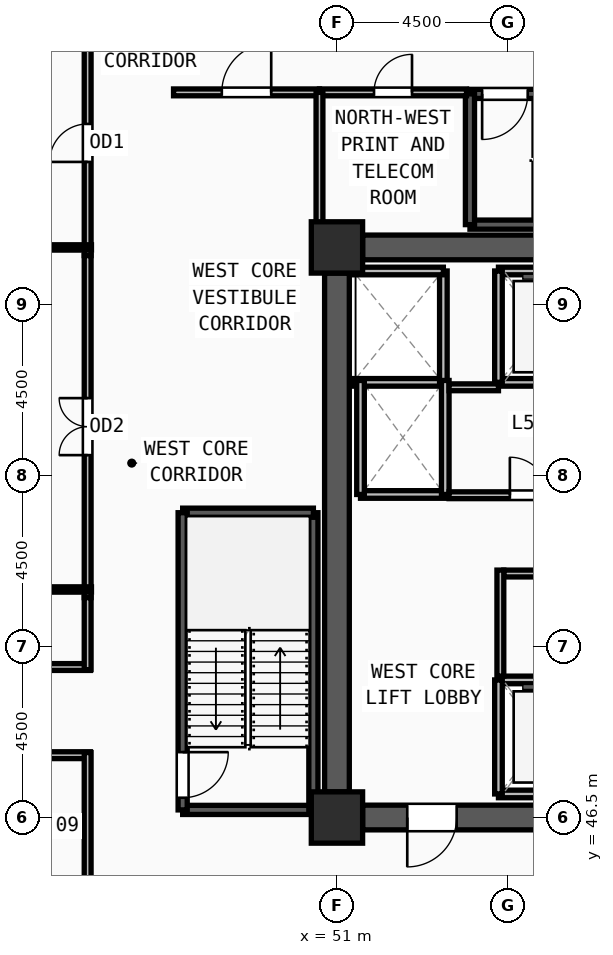
"""IFC4 building model, lengths in metres.
Left out: names, types, materials, properties, quantities, classifications, styles, units other than length and angle.
Written with IfcOpenShell. Run it as: python <this file> out.ifc"""

import sys

from ifc_helpers import new_model, si_unit, direction, frame, frame_2d, origin, origin_2d, place, context, subcontext, project, spatial, rectangle, extrude, source, transform, mapped, element, fill, save


model = new_model("IFC4")
c1 = context("Model", 3, precision=1e-05, world=origin(), true_north=direction((0.0, 1.0)))
c2 = subcontext(c1, "Body", "Model", "MODEL_VIEW")
j1 = project(units=[si_unit("LENGTHUNIT", "METRE"), si_unit("PLANEANGLEUNIT", "RADIAN")], contexts=[c1])
p1 = place(None, origin())
s1 = spatial("IfcSite", under=j1, at=p1, CompositionType="ELEMENT")
p2 = place(p1, origin())
s2 = spatial("IfcBuilding", under=s1, at=p2, CompositionType="ELEMENT")
p3 = place(p2, frame((0.0, 0.0, 201.75)))
s3 = spatial("IfcBuildingStorey", under=s2, at=p3, CompositionType="ELEMENT", Elevation=201.75)
m1 = source(origin(), c2, "Body", "SweptSolid", [
    extrude(rectangle(XDim=1.35, YDim=1.35, at=origin_2d()), origin(), (0.0, 0.0, 1.0), 3.75),
])
for number, where, z_axis, x_axis in (
    (1, (51.0, 46.5, 0.0), (0.0, 0.0, 1.0), (1.0, 0.0, 0.0)),
    (2, (51.0, 61.5, 0.0), (0.0, 0.0, 1.0), (1.0, 0.0, 0.0)),
):
    element("IfcColumn", number, at=place(p3, frame(where, z_axis=z_axis, x_axis=x_axis)), inside=s3, PredefinedType="COLUMN", context=c2, shape_type="MappedRepresentation", body=[
        mapped(m1, transform((0.0, 0.0, 0.0), x_axis=(1.0, 0.0, 0.0), y_axis=(0.0, 1.0, 0.0), z_axis=(0.0, 0.0, 1.0), scale=1.0)),
    ])
p4 = place(p3, frame((51.675, 61.5, 0.0), z_axis=(0.0, 0.0, 1.0), x_axis=(1.0, 0.0, 0.0)))
e3 = element("IfcWall", 3, at=p4, inside=s3, PredefinedType="SHEAR", context=c2, shape_type="SweptSolid", body=[
    extrude(rectangle(XDim=7.65, YDim=0.65, at=frame_2d((3.825, 0.0))), origin(), (0.0, 0.0, 1.0), 3.57),
])
p5 = place(p3, frame((59.325, 46.5, 0.0), z_axis=(0.0, 0.0, 1.0), x_axis=(-1.0, 0.0, 0.0)))
e4 = element("IfcWall", 4, at=p5, inside=s3, PredefinedType="SHEAR", context=c2, shape_type="SweptSolid", body=[
    extrude(rectangle(XDim=7.65, YDim=0.65, at=frame_2d((3.825, 0.0))), origin(), (0.0, 0.0, 1.0), 3.57),
])
m2 = source(origin(), c2, "Body", "SweptSolid", [
    extrude(rectangle(XDim=1.3, YDim=2.2, at=frame_2d((0.65, 1.1))), frame((0.0, 0.335, 0.0), z_axis=(0.0, -1.0, 0.0), x_axis=(1.0, 0.0, 0.0)), (0.0, 0.0, 1.0), 0.67),
])
p6 = place(p5, frame((5.175, 0.0, 0.0)))
e5 = element("IfcOpeningElement", 5, at=p6, cuts=e4, PredefinedType="OPENING", context=c2, shape_type="MappedRepresentation", body=[
    mapped(m2, transform((0.0, 0.0, 0.0), x_axis=(1.0, 0.0, 0.0), y_axis=(0.0, 1.0, 0.0), z_axis=(0.0, 0.0, 1.0), scale=1.0)),
])
m3 = source(origin(), c2, "Body", "SweptSolid", [
    extrude(rectangle(XDim=1.0, YDim=2.2, at=frame_2d((0.5, 1.1))), frame((0.0, 0.335, 0.0), z_axis=(0.0, -1.0, 0.0), x_axis=(1.0, 0.0, 0.0)), (0.0, 0.0, 1.0), 0.67),
])
p7 = place(p5, frame((0.675, 0.0, 0.0)))
e6 = element("IfcOpeningElement", 6, at=p7, cuts=e4, PredefinedType="OPENING", context=c2, shape_type="MappedRepresentation", body=[
    mapped(m3, transform((0.0, 0.0, 0.0), x_axis=(1.0, 0.0, 0.0), y_axis=(0.0, 1.0, 0.0), z_axis=(0.0, 0.0, 1.0), scale=1.0)),
])
p8 = place(p3, frame((51.0, 47.175, 0.0), z_axis=(0.0, 0.0, 1.0), x_axis=(0.0, 1.0, 0.0)))
e7 = element("IfcWall", 7, at=p8, inside=s3, PredefinedType="SHEAR", context=c2, shape_type="SweptSolid", body=[
    extrude(rectangle(XDim=13.65, YDim=0.65, at=frame_2d((6.825, 0.0))), origin(), (0.0, 0.0, 1.0), 3.57),
])
p9 = place(p3, frame((46.94, 46.7, 0.0), z_axis=(0.0, 0.0, 1.0), x_axis=(1.0, 0.0, 0.0)))
e8 = element("IfcWall", 8, at=p9, inside=s3, PredefinedType="SOLIDWALL", context=c2, shape_type="SweptSolid", body=[
    extrude(rectangle(XDim=3.44, YDim=0.24, at=frame_2d((1.72, 0.0))), origin(), (0.0, 0.0, 1.0), 3.57),
])
p10 = place(p3, frame((50.38, 46.7, 0.0), z_axis=(0.0, 0.0, 1.0), x_axis=(0.0, 1.0, 0.0)))
e9 = element("IfcWall", 9, at=p10, inside=s3, PredefinedType="SOLIDWALL", context=c2, shape_type="SweptSolid", body=[
    extrude(rectangle(XDim=7.82, YDim=0.24, at=frame_2d((3.91, 0.0))), origin(), (0.0, 0.0, 1.0), 3.57),
])
p11 = place(p3, frame((50.38, 54.52, 0.0), z_axis=(0.0, 0.0, 1.0), x_axis=(-1.0, 0.0, 0.0)))
e10 = element("IfcWall", 10, at=p11, inside=s3, PredefinedType="SOLIDWALL", context=c2, shape_type="SweptSolid", body=[
    extrude(rectangle(XDim=3.44, YDim=0.24, at=frame_2d((1.72, 0.0))), origin(), (0.0, 0.0, 1.0), 3.57),
])
p12 = place(p3, frame((46.94, 54.52, 0.0), z_axis=(0.0, 0.0, 1.0), x_axis=(0.0, -1.0, 0.0)))
e11 = element("IfcWall", 11, at=p12, inside=s3, PredefinedType="SOLIDWALL", context=c2, shape_type="SweptSolid", body=[
    extrude(rectangle(XDim=7.82, YDim=0.24, at=frame_2d((3.91, 0.0))), origin(), (0.0, 0.0, 1.0), 3.57),
])
m4 = source(origin(), c2, "Body", "SweptSolid", [
    extrude(rectangle(XDim=1.2, YDim=2.2, at=frame_2d((0.6, 1.1))), frame((0.0, 0.13, 0.0), z_axis=(0.0, -1.0, 0.0), x_axis=(1.0, 0.0, 0.0)), (0.0, 0.0, 1.0), 0.26),
])
p13 = place(p12, frame((6.3, 0.0, 0.0)))
e12 = element("IfcOpeningElement", 12, at=p13, cuts=e11, PredefinedType="OPENING", context=c2, shape_type="MappedRepresentation", body=[
    mapped(m4, transform((0.0, 0.0, 0.0), x_axis=(1.0, 0.0, 0.0), y_axis=(0.0, 1.0, 0.0), z_axis=(0.0, 0.0, 1.0), scale=1.0)),
])
p14 = place(p3, frame((54.5, 62.1, 0.0), z_axis=(0.0, 0.0, 1.0), x_axis=(1.0, 0.0, 0.0)))
e13 = element("IfcWall", 13, at=p14, inside=s3, PredefinedType="SOLIDWALL", context=c2, shape_type="SweptSolid", body=[
    extrude(rectangle(XDim=7.82, YDim=0.24, at=frame_2d((3.91, 0.0))), origin(), (0.0, 0.0, 1.0), 3.57),
])
p15 = place(p3, frame((62.32, 65.54, 0.0), z_axis=(0.0, 0.0, 1.0), x_axis=(-1.0, 0.0, 0.0)))
e14 = element("IfcWall", 14, at=p15, inside=s3, PredefinedType="SOLIDWALL", context=c2, shape_type="SweptSolid", body=[
    extrude(rectangle(XDim=7.82, YDim=0.24, at=frame_2d((3.91, 0.0))), origin(), (0.0, 0.0, 1.0), 3.57),
])
p16 = place(p15, frame((6.3, 0.0, 0.0)))
e15 = element("IfcOpeningElement", 15, at=p16, cuts=e14, PredefinedType="OPENING", context=c2, shape_type="MappedRepresentation", body=[
    mapped(m4, transform((0.0, 0.0, 0.0), x_axis=(1.0, 0.0, 0.0), y_axis=(0.0, 1.0, 0.0), z_axis=(0.0, 0.0, 1.0), scale=1.0)),
])
p17 = place(p3, frame((54.5, 65.54, 0.0), z_axis=(0.0, 0.0, 1.0), x_axis=(0.0, -1.0, 0.0)))
e16 = element("IfcWall", 16, at=p17, inside=s3, PredefinedType="SOLIDWALL", context=c2, shape_type="SweptSolid", body=[
    extrude(rectangle(XDim=3.44, YDim=0.24, at=frame_2d((1.72, 0.0))), origin(), (0.0, 0.0, 1.0), 3.57),
])
for number, where, z_axis, x_axis in (
    (17, (55.25, 47.12, 0.0), (0.0, 0.0, 1.0), (1.0, 0.0, 0.0)),
    (18, (57.65, 50.12, 0.0), (0.0, 0.0, 1.0), (-1.0, 0.0, 0.0)),
):
    element("IfcWall", number, at=place(p3, frame(where, z_axis=z_axis, x_axis=x_axis)), inside=s3, PredefinedType="SOLIDWALL", context=c2, shape_type="SweptSolid", body=[
        extrude(rectangle(XDim=2.4, YDim=0.2, at=frame_2d((1.2, 0.0))), origin(), (0.0, 0.0, 1.0), 3.57),
    ])
p18 = place(p3, frame((55.25, 50.12, 0.0), z_axis=(0.0, 0.0, 1.0), x_axis=(0.0, -1.0, 0.0)))
e19 = element("IfcWall", 19, at=p18, inside=s3, PredefinedType="SOLIDWALL", context=c2, shape_type="SweptSolid", body=[
    extrude(rectangle(XDim=3.0, YDim=0.2, at=frame_2d((1.5, 0.0))), origin(), (0.0, 0.0, 1.0), 3.57),
])
for number, where, z_axis, x_axis in (
    (20, (55.25, 57.95, 0.0), (0.0, 0.0, 1.0), (1.0, 0.0, 0.0)),
    (21, (57.65, 60.88, 0.0), (0.0, 0.0, 1.0), (-1.0, 0.0, 0.0)),
):
    element("IfcWall", number, at=place(p3, frame(where, z_axis=z_axis, x_axis=x_axis)), inside=s3, PredefinedType="SOLIDWALL", context=c2, shape_type="SweptSolid", body=[
        extrude(rectangle(XDim=2.4, YDim=0.2, at=frame_2d((1.2, 0.0))), origin(), (0.0, 0.0, 1.0), 3.57),
    ])
p19 = place(p3, frame((55.25, 60.88, 0.0), z_axis=(0.0, 0.0, 1.0), x_axis=(0.0, -1.0, 0.0)))
e22 = element("IfcWall", 22, at=p19, inside=s3, PredefinedType="SOLIDWALL", context=c2, shape_type="SweptSolid", body=[
    extrude(rectangle(XDim=2.93, YDim=0.2, at=frame_2d((1.465, 0.0))), origin(), (0.0, 0.0, 1.0), 3.57),
])
p20 = place(p3, frame((51.4, 57.95, 0.0), z_axis=(0.0, 0.0, 1.0), x_axis=(1.0, 0.0, 0.0)))
e23 = element("IfcWall", 23, at=p20, inside=s3, PredefinedType="SOLIDWALL", context=c2, shape_type="SweptSolid", body=[
    extrude(rectangle(XDim=2.4, YDim=0.2, at=frame_2d((1.2, 0.0))), origin(), (0.0, 0.0, 1.0), 3.57),
])
p21 = place(p3, frame((53.8, 57.95, 0.0), z_axis=(0.0, 0.0, 1.0), x_axis=(0.0, 1.0, 0.0)))
e24 = element("IfcWall", 24, at=p21, inside=s3, PredefinedType="SOLIDWALL", context=c2, shape_type="SweptSolid", body=[
    extrude(rectangle(XDim=2.93, YDim=0.2, at=frame_2d((1.465, 0.0))), origin(), (0.0, 0.0, 1.0), 3.57),
])
p22 = place(p3, frame((53.8, 60.88, 0.0), z_axis=(0.0, 0.0, 1.0), x_axis=(-1.0, 0.0, 0.0)))
e25 = element("IfcWall", 25, at=p22, inside=s3, PredefinedType="SOLIDWALL", context=c2, shape_type="SweptSolid", body=[
    extrude(rectangle(XDim=2.4, YDim=0.2, at=frame_2d((1.2, 0.0))), origin(), (0.0, 0.0, 1.0), 3.57),
])
p23 = place(p3, frame((51.62, 55.0, 0.0), z_axis=(0.0, 0.0, 1.0), x_axis=(1.0, 0.0, 0.0)))
e26 = element("IfcWall", 26, at=p23, inside=s3, PredefinedType="SOLIDWALL", context=c2, shape_type="SweptSolid", body=[
    extrude(rectangle(XDim=2.23, YDim=0.2, at=frame_2d((1.115, 0.0))), origin(), (0.0, 0.0, 1.0), 3.57),
])
for number, where, z_axis, x_axis in (
    (27, (53.85, 55.0, 0.0), (0.0, 0.0, 1.0), (0.0, 1.0, 0.0)),
    (28, (51.62, 58.0, 0.0), (0.0, 0.0, 1.0), (0.0, -1.0, 0.0)),
):
    element("IfcWall", number, at=place(p3, frame(where, z_axis=z_axis, x_axis=x_axis)), inside=s3, PredefinedType="SOLIDWALL", context=c2, shape_type="SweptSolid", body=[
        extrude(rectangle(XDim=3.0, YDim=0.2, at=frame_2d((1.5, 0.0))), origin(), (0.0, 0.0, 1.0), 3.57),
    ])
p24 = place(p3, frame((55.39, 52.92, 0.0), z_axis=(0.0, 0.0, 1.0), x_axis=(1.0, 0.0, 0.0)))
e29 = element("IfcWall", 29, at=p24, inside=s3, PredefinedType="PARTITIONING", context=c2, shape_type="SweptSolid", body=[
    extrude(rectangle(XDim=9.22, YDim=0.18, at=frame_2d((4.61, 0.0))), origin(), (0.0, 0.0, 1.0), 3.57),
])
m5 = source(origin(), c2, "Body", "SweptSolid", [
    extrude(rectangle(XDim=0.85, YDim=2.1, at=frame_2d((0.425, 1.05))), frame((0.0, 0.1, 0.0), z_axis=(0.0, -1.0, 0.0), x_axis=(1.0, 0.0, 0.0)), (0.0, 0.0, 1.0), 0.2),
])
p25 = place(p24, frame((4.185, 0.0, 0.0)))
e30 = element("IfcOpeningElement", 30, at=p25, cuts=e29, PredefinedType="OPENING", context=c2, shape_type="MappedRepresentation", body=[
    mapped(m5, transform((0.0, 0.0, 0.0), x_axis=(1.0, 0.0, 0.0), y_axis=(0.0, 1.0, 0.0), z_axis=(0.0, 0.0, 1.0), scale=1.0)),
])
p26 = place(p3, frame((53.95, 54.98, 0.0), z_axis=(0.0, 0.0, 1.0), x_axis=(1.0, 0.0, 0.0)))
e31 = element("IfcWall", 31, at=p26, inside=s3, PredefinedType="PARTITIONING", context=c2, shape_type="SweptSolid", body=[
    extrude(rectangle(XDim=4.21, YDim=0.18, at=frame_2d((2.105, 0.0))), origin(), (0.0, 0.0, 1.0), 3.57),
])
m6 = source(origin(), c2, "Body", "SweptSolid", [
    extrude(rectangle(XDim=1.0, YDim=2.2, at=frame_2d((0.5, 1.1))), frame((0.0, 0.1, 0.0), z_axis=(0.0, -1.0, 0.0), x_axis=(1.0, 0.0, 0.0)), (0.0, 0.0, 1.0), 0.2),
])
p27 = place(p26, frame((1.6, 0.0, 0.0)))
e32 = element("IfcOpeningElement", 32, at=p27, cuts=e31, PredefinedType="OPENING", context=c2, shape_type="MappedRepresentation", body=[
    mapped(m6, transform((0.0, 0.0, 0.0), x_axis=(1.0, 0.0, 0.0), y_axis=(0.0, 1.0, 0.0), z_axis=(0.0, 0.0, 1.0), scale=1.0)),
])
p28 = place(p3, frame((50.54, 65.58, 0.0), z_axis=(0.0, 0.0, 1.0), x_axis=(1.0, 0.0, 0.0)))
e33 = element("IfcWall", 33, at=p28, inside=s3, PredefinedType="PARTITIONING", context=c2, shape_type="SweptSolid", body=[
    extrude(rectangle(XDim=3.87, YDim=0.18, at=frame_2d((1.935, 0.0))), origin(), (0.0, 0.0, 1.0), 3.57),
])
p29 = place(p28, frame((1.435, 0.0, 0.0)))
e34 = element("IfcOpeningElement", 34, at=p29, cuts=e33, PredefinedType="OPENING", context=c2, shape_type="MappedRepresentation", body=[
    mapped(m6, transform((0.0, 0.0, 0.0), x_axis=(1.0, 0.0, 0.0), y_axis=(0.0, 1.0, 0.0), z_axis=(0.0, 0.0, 1.0), scale=1.0)),
])
p30 = place(p3, frame((46.7, 65.58, 0.0), z_axis=(0.0, 0.0, 1.0), x_axis=(1.0, 0.0, 0.0)))
e35 = element("IfcWall", 35, at=p30, inside=s3, PredefinedType="PARTITIONING", context=c2, shape_type="SweptSolid", body=[
    extrude(rectangle(XDim=3.84, YDim=0.18, at=frame_2d((1.92, 0.0))), origin(), (0.0, 0.0, 1.0), 3.57),
])
m7 = source(origin(), c2, "Body", "SweptSolid", [
    extrude(rectangle(XDim=1.3, YDim=2.2, at=frame_2d((0.65, 1.1))), frame((0.0, 0.1, 0.0), z_axis=(0.0, -1.0, 0.0), x_axis=(1.0, 0.0, 0.0)), (0.0, 0.0, 1.0), 0.2),
])
p31 = place(p30, frame((1.27, 0.0, 0.0)))
e36 = element("IfcOpeningElement", 36, at=p31, cuts=e35, PredefinedType="OPENING", context=c2, shape_type="MappedRepresentation", body=[
    mapped(m7, transform((0.0, 0.0, 0.0), x_axis=(1.0, 0.0, 0.0), y_axis=(0.0, 1.0, 0.0), z_axis=(0.0, 0.0, 1.0), scale=1.0)),
])
p32 = place(p3, frame((44.44, 61.285, 0.0), z_axis=(0.0, 0.0, 1.0), x_axis=(0.0, 1.0, 0.0)))
e37 = element("IfcWall", 37, at=p32, inside=s3, PredefinedType="PARTITIONING", context=c2, shape_type="SweptSolid", body=[
    extrude(rectangle(XDim=5.93, YDim=0.18, at=frame_2d((2.965, 0.0))), origin(), (0.0, 0.0, 1.0), 3.57),
])
p33 = place(p32, frame((2.465, 0.0, 0.0)))
e38 = element("IfcOpeningElement", 38, at=p33, cuts=e37, PredefinedType="OPENING", context=c2, shape_type="MappedRepresentation", body=[
    mapped(m6, transform((0.0, 0.0, 0.0), x_axis=(1.0, 0.0, 0.0), y_axis=(0.0, 1.0, 0.0), z_axis=(0.0, 0.0, 1.0), scale=1.0)),
])
p34 = place(p3, frame((44.44, 52.285, 0.0), z_axis=(0.0, 0.0, 1.0), x_axis=(0.0, 1.0, 0.0)))
e39 = element("IfcWall", 39, at=p34, inside=s3, PredefinedType="PARTITIONING", context=c2, shape_type="SweptSolid", body=[
    extrude(rectangle(XDim=9.0, YDim=0.18, at=frame_2d((4.5, 0.0))), origin(), (0.0, 0.0, 1.0), 3.57),
])
m8 = source(origin(), c2, "Body", "SweptSolid", [
    extrude(rectangle(XDim=1.5, YDim=2.2, at=frame_2d((0.75, 1.1))), frame((0.0, 0.1, 0.0), z_axis=(0.0, -1.0, 0.0), x_axis=(1.0, 0.0, 0.0)), (0.0, 0.0, 1.0), 0.2),
])
p35 = place(p34, frame((3.75, 0.0, 0.0)))
e40 = element("IfcOpeningElement", 40, at=p35, cuts=e39, PredefinedType="OPENING", context=c2, shape_type="MappedRepresentation", body=[
    mapped(m8, transform((0.0, 0.0, 0.0), x_axis=(1.0, 0.0, 0.0), y_axis=(0.0, 1.0, 0.0), z_axis=(0.0, 0.0, 1.0), scale=1.0)),
])
p36 = place(p3, frame((33.704, 50.46, 0.0), z_axis=(0.0, 0.0, 1.0), x_axis=(1.0, 0.0, 0.0)))
e41 = element("IfcWall", 41, at=p36, inside=s3, PredefinedType="PARTITIONING", context=c2, shape_type="SweptSolid", body=[
    extrude(rectangle(XDim=10.806, YDim=0.18, at=frame_2d((5.403, 0.0))), origin(), (0.0, 0.0, 1.0), 3.57),
])
p37 = place(p36, frame((4.903, 0.0, 0.0)))
e42 = element("IfcOpeningElement", 42, at=p37, cuts=e41, PredefinedType="OPENING", context=c2, shape_type="MappedRepresentation", body=[
    mapped(m6, transform((0.0, 0.0, 0.0), x_axis=(1.0, 0.0, 0.0), y_axis=(0.0, 1.0, 0.0), z_axis=(0.0, 0.0, 1.0), scale=1.0)),
])
p38 = place(p3, frame((44.51, 48.14, 0.0), z_axis=(0.0, 0.0, 1.0), x_axis=(-1.0, 0.0, 0.0)))
e43 = element("IfcWall", 43, at=p38, inside=s3, PredefinedType="PARTITIONING", context=c2, shape_type="SweptSolid", body=[
    extrude(rectangle(XDim=9.686, YDim=0.18, at=frame_2d((4.843, 0.0))), origin(), (0.0, 0.0, 1.0), 3.57),
])
p39 = place(p38, frame((4.343, 0.0, 0.0)))
e44 = element("IfcOpeningElement", 44, at=p39, cuts=e43, PredefinedType="OPENING", context=c2, shape_type="MappedRepresentation", body=[
    mapped(m6, transform((0.0, 0.0, 0.0), x_axis=(1.0, 0.0, 0.0), y_axis=(0.0, 1.0, 0.0), z_axis=(0.0, 0.0, 1.0), scale=1.0)),
])
p40 = place(p3, frame((50.54, 61.95, 0.0), z_axis=(0.0, 0.0, 1.0), x_axis=(0.0, 1.0, 0.0)))
e45 = element("IfcWall", 45, at=p40, inside=s3, PredefinedType="PARTITIONING", context=c2, shape_type="SweptSolid", body=[
    extrude(rectangle(XDim=3.63, YDim=0.18, at=frame_2d((1.815, 0.0))), origin(), (0.0, 0.0, 1.0), 3.57),
])
p41 = place(p3, frame((44.44, 50.39, 0.0), z_axis=(0.0, 0.0, 1.0), x_axis=(0.0, 1.0, 0.0)))
e46 = element("IfcWall", 46, at=p41, inside=s3, PredefinedType="PARTITIONING", context=c2, shape_type="SweptSolid", body=[
    extrude(rectangle(XDim=1.895, YDim=0.18, at=frame_2d((0.948, 0.0))), origin(), (0.0, 0.0, 1.0), 3.57),
])
p42 = place(p3, frame((44.44, 44.385, 0.0), z_axis=(0.0, 0.0, 1.0), x_axis=(0.0, 1.0, 0.0)))
e47 = element("IfcWall", 47, at=p42, inside=s3, PredefinedType="PARTITIONING", context=c2, shape_type="SweptSolid", body=[
    extrude(rectangle(XDim=3.825, YDim=0.18, at=frame_2d((1.913, 0.0))), origin(), (0.0, 0.0, 1.0), 3.57),
])
p43 = place(p3, frame((44.54, 52.5, 0.0), z_axis=(0.0, 0.0, 1.0), x_axis=(-1.0, 0.0, 0.0)))
e48 = element("IfcWall", 48, at=p43, inside=s3, PredefinedType="PARTITIONING", context=c2, shape_type="SweptSolid", body=[
    extrude(rectangle(XDim=11.929, YDim=0.14, at=frame_2d((5.964, 0.0))), origin(), (0.0, 0.0, 1.0), 3.57),
])
p44 = place(p3, frame((44.54, 61.5, 0.0), z_axis=(0.0, 0.0, 1.0), x_axis=(-1.0, 0.0, 0.0)))
e49 = element("IfcWall", 49, at=p44, inside=s3, PredefinedType="PARTITIONING", context=c2, shape_type="SweptSolid", body=[
    extrude(rectangle(XDim=16.275, YDim=0.14, at=frame_2d((8.138, 0.0))), origin(), (0.0, 0.0, 1.0), 3.57),
])
p45 = place(p3, frame((55.3, 50.22, 0.0), z_axis=(0.0, 0.0, 1.0), x_axis=(0.0, 1.0, 0.0)))
e50 = element("IfcWall", 50, at=p45, inside=s3, PredefinedType="PARTITIONING", context=c2, shape_type="SweptSolid", body=[
    extrude(rectangle(XDim=2.79, YDim=0.18, at=frame_2d((1.395, 0.0))), origin(), (0.0, 0.0, 1.0), 3.57),
])
p46 = place(p3, frame((53.95, 57.82, 0.0), z_axis=(0.0, 0.0, 1.0), x_axis=(1.0, 0.0, 0.0)))
e51 = element("IfcWall", 51, at=p46, inside=s3, PredefinedType="PARTITIONING", context=c2, shape_type="SweptSolid", body=[
    extrude(rectangle(XDim=1.3, YDim=0.18, at=frame_2d((0.65, 0.0))), origin(), (0.0, 0.0, 1.0), 3.57),
])
m9 = source(origin(), c2, "Body", "SweptSolid", [
    extrude(rectangle(XDim=1.3, YDim=2.2, at=frame_2d((0.65, 1.1))), frame((0.0, 0.025, 0.0), z_axis=(0.0, -1.0, 0.0), x_axis=(1.0, 0.0, 0.0)), (0.0, 0.0, 1.0), 0.05),
])
p47 = place(p6, origin())
e52 = element("IfcDoor", 52, at=p47, inside=s3, OperationType="SINGLE_SWING_RIGHT", PredefinedType="DOOR", context=c2, shape_type="MappedRepresentation", body=[
    mapped(m9, transform((0.0, 0.0, 0.0), x_axis=(1.0, 0.0, 0.0), y_axis=(0.0, 1.0, 0.0), z_axis=(0.0, 0.0, 1.0), scale=1.0)),
])
fill(e5, e52)
m10 = source(origin(), c2, "Body", "SweptSolid", [
    extrude(rectangle(XDim=1.2, YDim=2.2, at=frame_2d((0.6, 1.1))), frame((0.0, 0.025, 0.0), z_axis=(0.0, -1.0, 0.0), x_axis=(1.0, 0.0, 0.0)), (0.0, 0.0, 1.0), 0.05),
])
p48 = place(p13, origin())
e53 = element("IfcDoor", 53, at=p48, inside=s3, OperationType="SINGLE_SWING_LEFT", PredefinedType="DOOR", context=c2, shape_type="MappedRepresentation", body=[
    mapped(m10, transform((0.0, 0.0, 0.0), x_axis=(1.0, 0.0, 0.0), y_axis=(0.0, 1.0, 0.0), z_axis=(0.0, 0.0, 1.0), scale=1.0)),
])
fill(e12, e53)
p49 = place(p16, origin())
e54 = element("IfcDoor", 54, at=p49, inside=s3, OperationType="SINGLE_SWING_RIGHT", PredefinedType="DOOR", context=c2, shape_type="MappedRepresentation", body=[
    mapped(m10, transform((0.0, 0.0, 0.0), x_axis=(1.0, 0.0, 0.0), y_axis=(0.0, 1.0, 0.0), z_axis=(0.0, 0.0, 1.0), scale=1.0)),
])
fill(e15, e54)
m11 = source(origin(), c2, "Body", "SweptSolid", [
    extrude(rectangle(XDim=1.0, YDim=2.2, at=frame_2d((0.5, 1.1))), frame((0.0, 0.025, 0.0), z_axis=(0.0, -1.0, 0.0), x_axis=(1.0, 0.0, 0.0)), (0.0, 0.0, 1.0), 0.05),
])
p50 = place(p27, origin())
e55 = element("IfcDoor", 55, at=p50, inside=s3, OperationType="SINGLE_SWING_LEFT", PredefinedType="DOOR", context=c2, shape_type="MappedRepresentation", body=[
    mapped(m11, transform((0.0, 0.0, 0.0), x_axis=(1.0, 0.0, 0.0), y_axis=(0.0, 1.0, 0.0), z_axis=(0.0, 0.0, 1.0), scale=1.0)),
])
fill(e32, e55)
p51 = place(p29, origin())
e56 = element("IfcDoor", 56, at=p51, inside=s3, OperationType="SINGLE_SWING_RIGHT", PredefinedType="DOOR", context=c2, shape_type="MappedRepresentation", body=[
    mapped(m11, transform((0.0, 0.0, 0.0), x_axis=(1.0, 0.0, 0.0), y_axis=(0.0, 1.0, 0.0), z_axis=(0.0, 0.0, 1.0), scale=1.0)),
])
fill(e34, e56)
p52 = place(p31, origin())
e57 = element("IfcDoor", 57, at=p52, inside=s3, OperationType="SINGLE_SWING_RIGHT", PredefinedType="DOOR", context=c2, shape_type="MappedRepresentation", body=[
    mapped(m9, transform((0.0, 0.0, 0.0), x_axis=(1.0, 0.0, 0.0), y_axis=(0.0, 1.0, 0.0), z_axis=(0.0, 0.0, 1.0), scale=1.0)),
])
fill(e36, e57)
p53 = place(p33, origin())
e58 = element("IfcDoor", 58, at=p53, inside=s3, OperationType="SINGLE_SWING_LEFT", PredefinedType="DOOR", context=c2, shape_type="MappedRepresentation", body=[
    mapped(m11, transform((0.0, 0.0, 0.0), x_axis=(1.0, 0.0, 0.0), y_axis=(0.0, 1.0, 0.0), z_axis=(0.0, 0.0, 1.0), scale=1.0)),
])
fill(e38, e58)
m12 = source(origin(), c2, "Body", "SweptSolid", [
    extrude(rectangle(XDim=1.5, YDim=2.2, at=frame_2d((0.75, 1.1))), frame((0.0, 0.025, 0.0), z_axis=(0.0, -1.0, 0.0), x_axis=(1.0, 0.0, 0.0)), (0.0, 0.0, 1.0), 0.05),
])
p54 = place(p35, origin())
e59 = element("IfcDoor", 59, at=p54, inside=s3, OperationType="DOUBLE_DOOR_SINGLE_SWING", PredefinedType="DOOR", context=c2, shape_type="MappedRepresentation", body=[
    mapped(m12, transform((0.0, 0.0, 0.0), x_axis=(1.0, 0.0, 0.0), y_axis=(0.0, 1.0, 0.0), z_axis=(0.0, 0.0, 1.0), scale=1.0)),
])
fill(e40, e59)
save(model, sys.argv[1])
